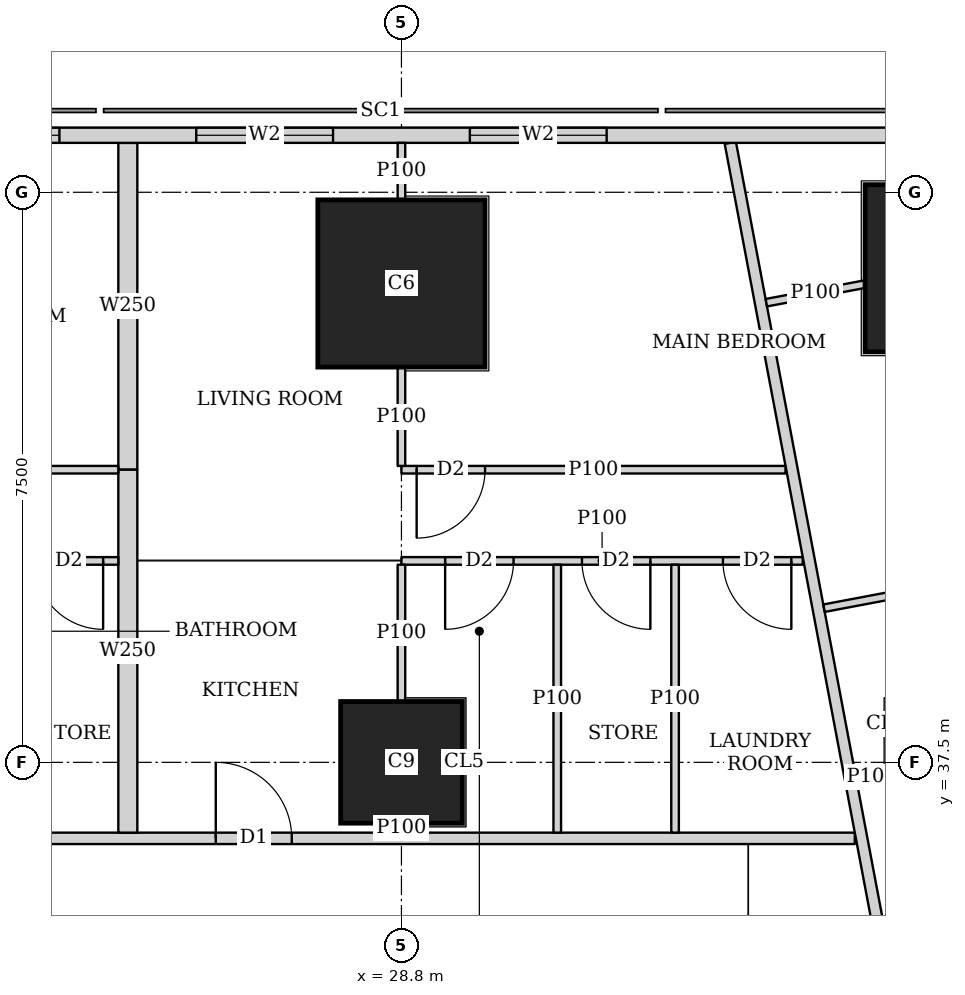
"""IFC4 building model, lengths in metres.
Left out: names, types, materials, properties, quantities, classifications, styles, units other than length and angle.
Written with IfcOpenShell. Run it as: python <this file> out.ifc"""

import sys

from ifc_helpers import new_model, si_unit, direction, frame, frame_2d, origin, origin_2d, place, context, subcontext, project, spatial, rectangle, extrude, element, fill, save


model = new_model("IFC4")
c1 = context("Model", 3, precision=1e-05, world=origin(), true_north=direction((0.0, 1.0)))
c2 = subcontext(c1, "Body", "Model", "MODEL_VIEW")
j1 = project(units=[si_unit("LENGTHUNIT", "METRE"), si_unit("PLANEANGLEUNIT", "RADIAN")], contexts=[c1])
p1 = place(None, origin())
s1 = spatial("IfcSite", under=j1, at=p1, CompositionType="ELEMENT")
p2 = place(p1, origin())
s2 = spatial("IfcBuilding", under=s1, at=p2, CompositionType="ELEMENT")
p3 = place(p2, frame((0.0, 0.0, 89.15)))
s3 = spatial("IfcBuildingStorey", under=s2, at=p3, CompositionType="ELEMENT", Elevation=89.15)
p4 = place(p3, frame((28.8, 37.5, 0.0), z_axis=(0.0, 0.0, 1.0), x_axis=(1.0, 0.0, 0.0)))
e1 = element("IfcColumn", 1, at=p4, inside=s3, PredefinedType="COLUMN", context=c2, shape_type="SweptSolid", body=[
    extrude(rectangle(XDim=1.6, YDim=1.6, at=origin_2d()), origin(), (0.0, 0.0, 1.0), 3.75),
])
for number, where, z_axis, x_axis in (
    (2, (28.8, 43.8, 0.0), (0.0, 0.0, 1.0), (1.0, 0.0, 0.0)),
    (3, (36.0, 44.0, 0.0), (0.0, 0.0, 1.0), (1.0, 0.0, 0.0)),
):
    element("IfcColumn", number, at=place(p3, frame(where, z_axis=z_axis, x_axis=x_axis)), inside=s3, PredefinedType="COLUMN", context=c2, shape_type="SweptSolid", body=[
        extrude(rectangle(XDim=2.2, YDim=2.2, at=origin_2d()), origin(), (0.0, 0.0, 1.0), 3.75),
    ])
p5 = place(p3, frame((40.106, 45.75, 0.0), z_axis=(0.0, 0.0, 1.0), x_axis=(-1.0, 0.0, 0.0)))
e4 = element("IfcWall", 4, at=p5, inside=s3, PredefinedType="SOLIDWALL", context=c2, shape_type="SweptSolid", body=[
    extrude(rectangle(XDim=37.943, YDim=0.2, at=frame_2d((18.971, 0.0))), origin(), (0.0, 0.0, 1.0), 3.5),
])
p6 = place(p5, frame((8.606, 0.0, 0.9)))
e5 = element("IfcOpeningElement", 5, at=p6, cuts=e4, PredefinedType="OPENING", context=c2, shape_type="SweptSolid", body=[
    extrude(rectangle(XDim=1.8, YDim=1.5, at=frame_2d((0.9, 0.75))), frame((0.0, 0.11, 0.0), z_axis=(0.0, -1.0, 0.0), x_axis=(1.0, 0.0, 0.0)), (0.0, 0.0, 1.0), 0.22),
])
p7 = place(p5, frame((12.206, 0.0, 0.9)))
e6 = element("IfcOpeningElement", 6, at=p7, cuts=e4, PredefinedType="OPENING", context=c2, shape_type="SweptSolid", body=[
    extrude(rectangle(XDim=1.8, YDim=1.5, at=frame_2d((0.9, 0.75))), frame((0.0, 0.11, 0.0), z_axis=(0.0, -1.0, 0.0), x_axis=(1.0, 0.0, 0.0)), (0.0, 0.0, 1.0), 0.22),
])
p8 = place(p5, frame((15.806, 0.0, 0.9)))
e7 = element("IfcOpeningElement", 7, at=p8, cuts=e4, PredefinedType="OPENING", context=c2, shape_type="SweptSolid", body=[
    extrude(rectangle(XDim=1.8, YDim=1.5, at=frame_2d((0.9, 0.75))), frame((0.0, 0.11, 0.0), z_axis=(0.0, -1.0, 0.0), x_axis=(1.0, 0.0, 0.0)), (0.0, 0.0, 1.0), 0.22),
])
p9 = place(p5, frame((19.406, 0.0, 0.9)))
e8 = element("IfcOpeningElement", 8, at=p9, cuts=e4, PredefinedType="OPENING", context=c2, shape_type="SweptSolid", body=[
    extrude(rectangle(XDim=1.8, YDim=1.5, at=frame_2d((0.9, 0.75))), frame((0.0, 0.11, 0.0), z_axis=(0.0, -1.0, 0.0), x_axis=(1.0, 0.0, 0.0)), (0.0, 0.0, 1.0), 0.22),
])
p10 = place(p5, frame((23.006, 0.0, 0.9)))
e9 = element("IfcOpeningElement", 9, at=p10, cuts=e4, PredefinedType="OPENING", context=c2, shape_type="SweptSolid", body=[
    extrude(rectangle(XDim=1.8, YDim=1.5, at=frame_2d((0.9, 0.75))), frame((0.0, 0.11, 0.0), z_axis=(0.0, -1.0, 0.0), x_axis=(1.0, 0.0, 0.0)), (0.0, 0.0, 1.0), 0.22),
])
p11 = place(p5, frame((26.606, 0.0, 0.9)))
e10 = element("IfcOpeningElement", 10, at=p11, cuts=e4, PredefinedType="OPENING", context=c2, shape_type="SweptSolid", body=[
    extrude(rectangle(XDim=1.8, YDim=1.5, at=frame_2d((0.9, 0.75))), frame((0.0, 0.11, 0.0), z_axis=(0.0, -1.0, 0.0), x_axis=(1.0, 0.0, 0.0)), (0.0, 0.0, 1.0), 0.22),
])
p12 = place(p3, frame((8.35, 36.5, 0.0), z_axis=(0.0, 0.0, 1.0), x_axis=(1.0, 0.0, 0.0)))
e11 = element("IfcWall", 11, at=p12, inside=s3, PredefinedType="SOLIDWALL", context=c2, shape_type="SweptSolid", body=[
    extrude(rectangle(XDim=26.415, YDim=0.15, at=frame_2d((13.208, 0.0))), origin(), (0.0, 0.0, 1.0), 3.5),
])
p13 = place(p12, frame((2.6, 0.0, 0.0)))
e12 = element("IfcOpeningElement", 12, at=p13, cuts=e11, PredefinedType="OPENING", context=c2, shape_type="SweptSolid", body=[
    extrude(rectangle(XDim=1.0, YDim=2.1, at=frame_2d((0.5, 1.05))), frame((0.0, 0.085, 0.0), z_axis=(0.0, -1.0, 0.0), x_axis=(1.0, 0.0, 0.0)), (0.0, 0.0, 1.0), 0.17),
])
p14 = place(p12, frame((10.75, 0.0, 0.0)))
e13 = element("IfcOpeningElement", 13, at=p14, cuts=e11, PredefinedType="OPENING", context=c2, shape_type="SweptSolid", body=[
    extrude(rectangle(XDim=1.0, YDim=2.1, at=frame_2d((0.5, 1.05))), frame((0.0, 0.085, 0.0), z_axis=(0.0, -1.0, 0.0), x_axis=(1.0, 0.0, 0.0)), (0.0, 0.0, 1.0), 0.17),
])
p15 = place(p12, frame((18.007, 0.0, 0.0)))
e14 = element("IfcOpeningElement", 14, at=p15, cuts=e11, PredefinedType="OPENING", context=c2, shape_type="SweptSolid", body=[
    extrude(rectangle(XDim=1.0, YDim=2.1, at=frame_2d((0.5, 1.05))), frame((0.0, 0.085, 0.0), z_axis=(0.0, -1.0, 0.0), x_axis=(1.0, 0.0, 0.0)), (0.0, 0.0, 1.0), 0.17),
])
p16 = place(p3, frame((33.127, 45.65, 0.0), z_axis=(0.0, 0.0, 1.0), x_axis=(0.185598547723, -0.98262565562, 0.0)))
e15 = element("IfcWall", 15, at=p16, inside=s3, PredefinedType="SOLIDWALL", context=c2, shape_type="SweptSolid", body=[
    extrude(rectangle(XDim=47.118, YDim=0.15, at=frame_2d((23.559, 0.0))), origin(), (0.0, 0.0, 1.0), 2.2),
])
p17 = place(p16, frame((15.285, 0.0, 0.0)))
e16 = element("IfcOpeningElement", 16, at=p17, cuts=e15, PredefinedType="OPENING", context=c2, shape_type="SweptSolid", body=[
    extrude(rectangle(XDim=1.0, YDim=2.1, at=frame_2d((0.5, 1.05))), frame((0.0, 0.085, 0.0), z_axis=(0.0, -1.0, 0.0), x_axis=(1.0, 0.0, 0.0)), (0.0, 0.0, 1.0), 0.17),
])
p18 = place(p16, frame((19.102, 0.0, 0.0)))
e17 = element("IfcOpeningElement", 17, at=p18, cuts=e15, PredefinedType="OPENING", context=c2, shape_type="SweptSolid", body=[
    extrude(rectangle(XDim=1.0, YDim=2.1, at=frame_2d((0.5, 1.05))), frame((0.0, 0.085, 0.0), z_axis=(0.0, -1.0, 0.0), x_axis=(1.0, 0.0, 0.0)), (0.0, 0.0, 1.0), 0.17),
])
p19 = place(p16, frame((33.88, 0.0, 0.0)))
e18 = element("IfcOpeningElement", 18, at=p19, cuts=e15, PredefinedType="OPENING", context=c2, shape_type="SweptSolid", body=[
    extrude(rectangle(XDim=1.0, YDim=2.1, at=frame_2d((0.5, 1.05))), frame((0.0, 0.085, 0.0), z_axis=(0.0, -1.0, 0.0), x_axis=(1.0, 0.0, 0.0)), (0.0, 0.0, 1.0), 0.17),
])
p20 = place(p3, frame((34.89, 43.79, 0.0), z_axis=(0.0, 0.0, 1.0), x_axis=(-0.982696831521, -0.185221319826, 0.0)))
e19 = element("IfcWall", 19, at=p20, inside=s3, PredefinedType="PARTITIONING", context=c2, shape_type="SweptSolid", body=[
    extrude(rectangle(XDim=1.312, YDim=0.1, at=frame_2d((0.656, 0.0))), origin(), (0.0, 0.0, 1.0), 2.05),
])
p21 = place(p3, frame((37.823, 40.182, 0.0), z_axis=(0.0, 0.0, 1.0), x_axis=(-0.98263926043, -0.185526504472, 0.0)))
e20 = element("IfcWall", 20, at=p21, inside=s3, PredefinedType="PARTITIONING", context=c2, shape_type="SweptSolid", body=[
    extrude(rectangle(XDim=3.524, YDim=0.1, at=frame_2d((1.762, 0.0))), origin(), (0.0, 0.0, 1.0), 3.5),
])
p22 = place(p3, frame((35.19, 37.347, 0.0), z_axis=(0.0, 0.0, 1.0), x_axis=(-0.982798158448, -0.184682916784, 0.0)))
e21 = element("IfcWall", 21, at=p22, inside=s3, PredefinedType="PARTITIONING", context=c2, shape_type="SweptSolid", body=[
    extrude(rectangle(XDim=0.411, YDim=0.1, at=frame_2d((0.206, 0.0))), origin(), (0.0, 0.0, 1.0), 3.5),
])
p23 = place(p3, frame((21.6, 41.35, 0.0), z_axis=(0.0, 0.0, 1.0), x_axis=(1.0, 0.0, 0.0)))
e22 = element("IfcWall", 22, at=p23, inside=s3, PredefinedType="PARTITIONING", context=c2, shape_type="SweptSolid", body=[
    extrude(rectangle(XDim=3.475, YDim=0.1, at=frame_2d((1.737, 0.0))), origin(), (0.0, 0.0, 1.0), 3.5),
])
p24 = place(p23, frame((0.2, 0.0, 0.0)))
e23 = element("IfcOpeningElement", 23, at=p24, cuts=e22, PredefinedType="OPENING", context=c2, shape_type="SweptSolid", body=[
    extrude(rectangle(XDim=0.9, YDim=2.1, at=frame_2d((0.45, 1.05))), frame((0.0, 0.06, 0.0), z_axis=(0.0, -1.0, 0.0), x_axis=(1.0, 0.0, 0.0)), (0.0, 0.0, 1.0), 0.12),
])
p25 = place(p3, frame((21.6, 40.15, 0.0), z_axis=(0.0, 0.0, 1.0), x_axis=(1.0, 0.0, 0.0)))
e24 = element("IfcWall", 24, at=p25, inside=s3, PredefinedType="PARTITIONING", context=c2, shape_type="SweptSolid", body=[
    extrude(rectangle(XDim=3.475, YDim=0.1, at=frame_2d((1.737, 0.0))), origin(), (0.0, 0.0, 1.0), 3.5),
])
p26 = place(p25, frame((0.575, 0.0, 0.0)))
e25 = element("IfcOpeningElement", 25, at=p26, cuts=e24, PredefinedType="OPENING", context=c2, shape_type="SweptSolid", body=[
    extrude(rectangle(XDim=0.9, YDim=2.1, at=frame_2d((0.45, 1.05))), frame((0.0, 0.06, 0.0), z_axis=(0.0, -1.0, 0.0), x_axis=(1.0, 0.0, 0.0)), (0.0, 0.0, 1.0), 0.12),
])
p27 = place(p25, frame((2.375, 0.0, 0.0)))
e26 = element("IfcOpeningElement", 26, at=p27, cuts=e24, PredefinedType="OPENING", context=c2, shape_type="SweptSolid", body=[
    extrude(rectangle(XDim=0.9, YDim=2.1, at=frame_2d((0.45, 1.05))), frame((0.0, 0.06, 0.0), z_axis=(0.0, -1.0, 0.0), x_axis=(1.0, 0.0, 0.0)), (0.0, 0.0, 1.0), 0.12),
])
p28 = place(p3, frame((28.8, 41.35, 0.0), z_axis=(0.0, 0.0, 1.0), x_axis=(1.0, 0.0, 0.0)))
e27 = element("IfcWall", 27, at=p28, inside=s3, PredefinedType="PARTITIONING", context=c2, shape_type="SweptSolid", body=[
    extrude(rectangle(XDim=5.053, YDim=0.1, at=frame_2d((2.526, 0.0))), origin(), (0.0, 0.0, 1.0), 3.5),
])
p29 = place(p28, frame((0.2, 0.0, 0.0)))
e28 = element("IfcOpeningElement", 28, at=p29, cuts=e27, PredefinedType="OPENING", context=c2, shape_type="SweptSolid", body=[
    extrude(rectangle(XDim=0.9, YDim=2.1, at=frame_2d((0.45, 1.05))), frame((0.0, 0.06, 0.0), z_axis=(0.0, -1.0, 0.0), x_axis=(1.0, 0.0, 0.0)), (0.0, 0.0, 1.0), 0.12),
])
p30 = place(p3, frame((28.8, 40.15, 0.0), z_axis=(0.0, 0.0, 1.0), x_axis=(1.0, 0.0, 0.0)))
e29 = element("IfcWall", 29, at=p30, inside=s3, PredefinedType="PARTITIONING", context=c2, shape_type="SweptSolid", body=[
    extrude(rectangle(XDim=5.28, YDim=0.1, at=frame_2d((2.64, 0.0))), origin(), (0.0, 0.0, 1.0), 3.5),
])
p31 = place(p30, frame((0.575, 0.0, 0.0)))
e30 = element("IfcOpeningElement", 30, at=p31, cuts=e29, PredefinedType="OPENING", context=c2, shape_type="SweptSolid", body=[
    extrude(rectangle(XDim=0.9, YDim=2.1, at=frame_2d((0.45, 1.05))), frame((0.0, 0.06, 0.0), z_axis=(0.0, -1.0, 0.0), x_axis=(1.0, 0.0, 0.0)), (0.0, 0.0, 1.0), 0.12),
])
p32 = place(p30, frame((4.23, 0.0, 0.0)))
e31 = element("IfcOpeningElement", 31, at=p32, cuts=e29, PredefinedType="OPENING", context=c2, shape_type="SweptSolid", body=[
    extrude(rectangle(XDim=0.9, YDim=2.1, at=frame_2d((0.45, 1.05))), frame((0.0, 0.06, 0.0), z_axis=(0.0, -1.0, 0.0), x_axis=(1.0, 0.0, 0.0)), (0.0, 0.0, 1.0), 0.12),
])
p33 = place(p30, frame((2.375, 0.0, 0.0)))
e32 = element("IfcOpeningElement", 32, at=p33, cuts=e29, PredefinedType="OPENING", context=c2, shape_type="SweptSolid", body=[
    extrude(rectangle(XDim=0.9, YDim=2.1, at=frame_2d((0.45, 1.05))), frame((0.0, 0.06, 0.0), z_axis=(0.0, -1.0, 0.0), x_axis=(1.0, 0.0, 0.0)), (0.0, 0.0, 1.0), 0.12),
])
p34 = place(p3, frame((28.8, 41.4, 0.0), z_axis=(0.0, 0.0, 1.0), x_axis=(0.0, 1.0, 0.0)))
e33 = element("IfcWall", 33, at=p34, inside=s3, PredefinedType="PARTITIONING", context=c2, shape_type="SweptSolid", body=[
    extrude(rectangle(XDim=1.299, YDim=0.1, at=frame_2d((0.649, 0.0))), origin(), (0.0, 0.0, 1.0), 3.5),
])
p35 = place(p3, frame((28.8, 44.901, 0.0), z_axis=(0.0, 0.0, 1.0), x_axis=(0.0, 1.0, 0.0)))
e34 = element("IfcWall", 34, at=p35, inside=s3, PredefinedType="PARTITIONING", context=c2, shape_type="SweptSolid", body=[
    extrude(rectangle(XDim=0.749, YDim=0.1, at=frame_2d((0.375, 0.0))), origin(), (0.0, 0.0, 1.0), 3.5),
])
p36 = place(p3, frame((28.8, 36.575, 0.0), z_axis=(0.0, 0.0, 1.0), x_axis=(0.0, 1.0, 0.0)))
e35 = element("IfcWall", 35, at=p36, inside=s3, PredefinedType="PARTITIONING", context=c2, shape_type="SweptSolid", body=[
    extrude(rectangle(XDim=0.124, YDim=0.1, at=frame_2d((0.062, 0.0))), origin(), (0.0, 0.0, 1.0), 3.5),
])
p37 = place(p3, frame((28.8, 38.301, 0.0), z_axis=(0.0, 0.0, 1.0), x_axis=(0.0, 1.0, 0.0)))
e36 = element("IfcWall", 36, at=p37, inside=s3, PredefinedType="PARTITIONING", context=c2, shape_type="SweptSolid", body=[
    extrude(rectangle(XDim=1.799, YDim=0.1, at=frame_2d((0.899, 0.0))), origin(), (0.0, 0.0, 1.0), 3.5),
])
for number, where, z_axis, x_axis in (
    (37, (32.4, 36.575, 0.0), (0.0, 0.0, 1.0), (0.0, 1.0, 0.0)),
    (38, (30.85, 36.575, 0.0), (0.0, 0.0, 1.0), (0.0, 1.0, 0.0)),
):
    element("IfcWall", number, at=place(p3, frame(where, z_axis=z_axis, x_axis=x_axis)), inside=s3, PredefinedType="PARTITIONING", context=c2, shape_type="SweptSolid", body=[
        extrude(rectangle(XDim=3.525, YDim=0.1, at=frame_2d((1.763, 0.0))), origin(), (0.0, 0.0, 1.0), 3.5),
    ])
p38 = place(p3, frame((25.2, 41.35, 0.0), z_axis=(0.0, 0.0, 1.0), x_axis=(0.0, 1.0, 0.0)))
e39 = element("IfcWall", 39, at=p38, inside=s3, PredefinedType="SOLIDWALL", context=c2, shape_type="SweptSolid", body=[
    extrude(rectangle(XDim=4.3, YDim=0.25, at=frame_2d((2.15, 0.0))), origin(), (0.0, 0.0, 1.0), 2.2),
])
p39 = place(p3, frame((25.2, 36.575, 0.0), z_axis=(0.0, 0.0, 1.0), x_axis=(0.0, 1.0, 0.0)))
e40 = element("IfcWall", 40, at=p39, inside=s3, PredefinedType="SOLIDWALL", context=c2, shape_type="SweptSolid", body=[
    extrude(rectangle(XDim=4.775, YDim=0.25, at=frame_2d((2.388, 0.0))), origin(), (0.0, 0.0, 1.0), 3.5),
])
p40 = place(p6, origin())
e41 = element("IfcWindow", 41, at=p40, inside=s3, PartitioningType="SINGLE_PANEL", PredefinedType="WINDOW", context=c2, shape_type="SweptSolid", body=[
    extrude(rectangle(XDim=1.8, YDim=1.5, at=frame_2d((0.9, 0.75))), frame((0.0, 0.03, 0.0), z_axis=(0.0, -1.0, 0.0), x_axis=(1.0, 0.0, 0.0)), (0.0, 0.0, 1.0), 0.06),
])
fill(e5, e41)
p41 = place(p7, origin())
e42 = element("IfcWindow", 42, at=p41, inside=s3, PartitioningType="SINGLE_PANEL", PredefinedType="WINDOW", context=c2, shape_type="SweptSolid", body=[
    extrude(rectangle(XDim=1.8, YDim=1.5, at=frame_2d((0.9, 0.75))), frame((0.0, 0.03, 0.0), z_axis=(0.0, -1.0, 0.0), x_axis=(1.0, 0.0, 0.0)), (0.0, 0.0, 1.0), 0.06),
])
fill(e6, e42)
p42 = place(p8, origin())
e43 = element("IfcWindow", 43, at=p42, inside=s3, PartitioningType="SINGLE_PANEL", PredefinedType="WINDOW", context=c2, shape_type="SweptSolid", body=[
    extrude(rectangle(XDim=1.8, YDim=1.5, at=frame_2d((0.9, 0.75))), frame((0.0, 0.03, 0.0), z_axis=(0.0, -1.0, 0.0), x_axis=(1.0, 0.0, 0.0)), (0.0, 0.0, 1.0), 0.06),
])
fill(e7, e43)
p43 = place(p27, origin())
e44 = element("IfcDoor", 44, at=p43, inside=s3, OperationType="SINGLE_SWING_LEFT", PredefinedType="DOOR", context=c2, shape_type="SweptSolid", body=[
    extrude(rectangle(XDim=0.9, YDim=2.1, at=frame_2d((0.45, 1.05))), frame((0.0, 0.025, 0.0), z_axis=(0.0, -1.0, 0.0), x_axis=(1.0, 0.0, 0.0)), (0.0, 0.0, 1.0), 0.05),
])
fill(e26, e44)
p44 = place(p29, origin())
e45 = element("IfcDoor", 45, at=p44, inside=s3, OperationType="SINGLE_SWING_RIGHT", PredefinedType="DOOR", context=c2, shape_type="SweptSolid", body=[
    extrude(rectangle(XDim=0.9, YDim=2.1, at=frame_2d((0.45, 1.05))), frame((0.0, 0.025, 0.0), z_axis=(0.0, -1.0, 0.0), x_axis=(1.0, 0.0, 0.0)), (0.0, 0.0, 1.0), 0.05),
])
fill(e28, e45)
p45 = place(p31, origin())
e46 = element("IfcDoor", 46, at=p45, inside=s3, OperationType="SINGLE_SWING_RIGHT", PredefinedType="DOOR", context=c2, shape_type="SweptSolid", body=[
    extrude(rectangle(XDim=0.9, YDim=2.1, at=frame_2d((0.45, 1.05))), frame((0.0, 0.025, 0.0), z_axis=(0.0, -1.0, 0.0), x_axis=(1.0, 0.0, 0.0)), (0.0, 0.0, 1.0), 0.05),
])
fill(e30, e46)
p46 = place(p32, origin())
e47 = element("IfcDoor", 47, at=p46, inside=s3, OperationType="SINGLE_SWING_LEFT", PredefinedType="DOOR", context=c2, shape_type="SweptSolid", body=[
    extrude(rectangle(XDim=0.9, YDim=2.1, at=frame_2d((0.45, 1.05))), frame((0.0, 0.025, 0.0), z_axis=(0.0, -1.0, 0.0), x_axis=(1.0, 0.0, 0.0)), (0.0, 0.0, 1.0), 0.05),
])
fill(e31, e47)
p47 = place(p33, origin())
e48 = element("IfcDoor", 48, at=p47, inside=s3, OperationType="SINGLE_SWING_LEFT", PredefinedType="DOOR", context=c2, shape_type="SweptSolid", body=[
    extrude(rectangle(XDim=0.9, YDim=2.1, at=frame_2d((0.45, 1.05))), frame((0.0, 0.025, 0.0), z_axis=(0.0, -1.0, 0.0), x_axis=(1.0, 0.0, 0.0)), (0.0, 0.0, 1.0), 0.05),
])
fill(e32, e48)
p48 = place(p15, origin())
e49 = element("IfcDoor", 49, at=p48, inside=s3, OperationType="SINGLE_SWING_LEFT", PredefinedType="DOOR", context=c2, shape_type="SweptSolid", body=[
    extrude(rectangle(XDim=1.0, YDim=2.1, at=frame_2d((0.5, 1.05))), frame((0.0, 0.025, 0.0), z_axis=(0.0, -1.0, 0.0), x_axis=(1.0, 0.0, 0.0)), (0.0, 0.0, 1.0), 0.05),
])
fill(e14, e49)
save(model, sys.argv[1])
